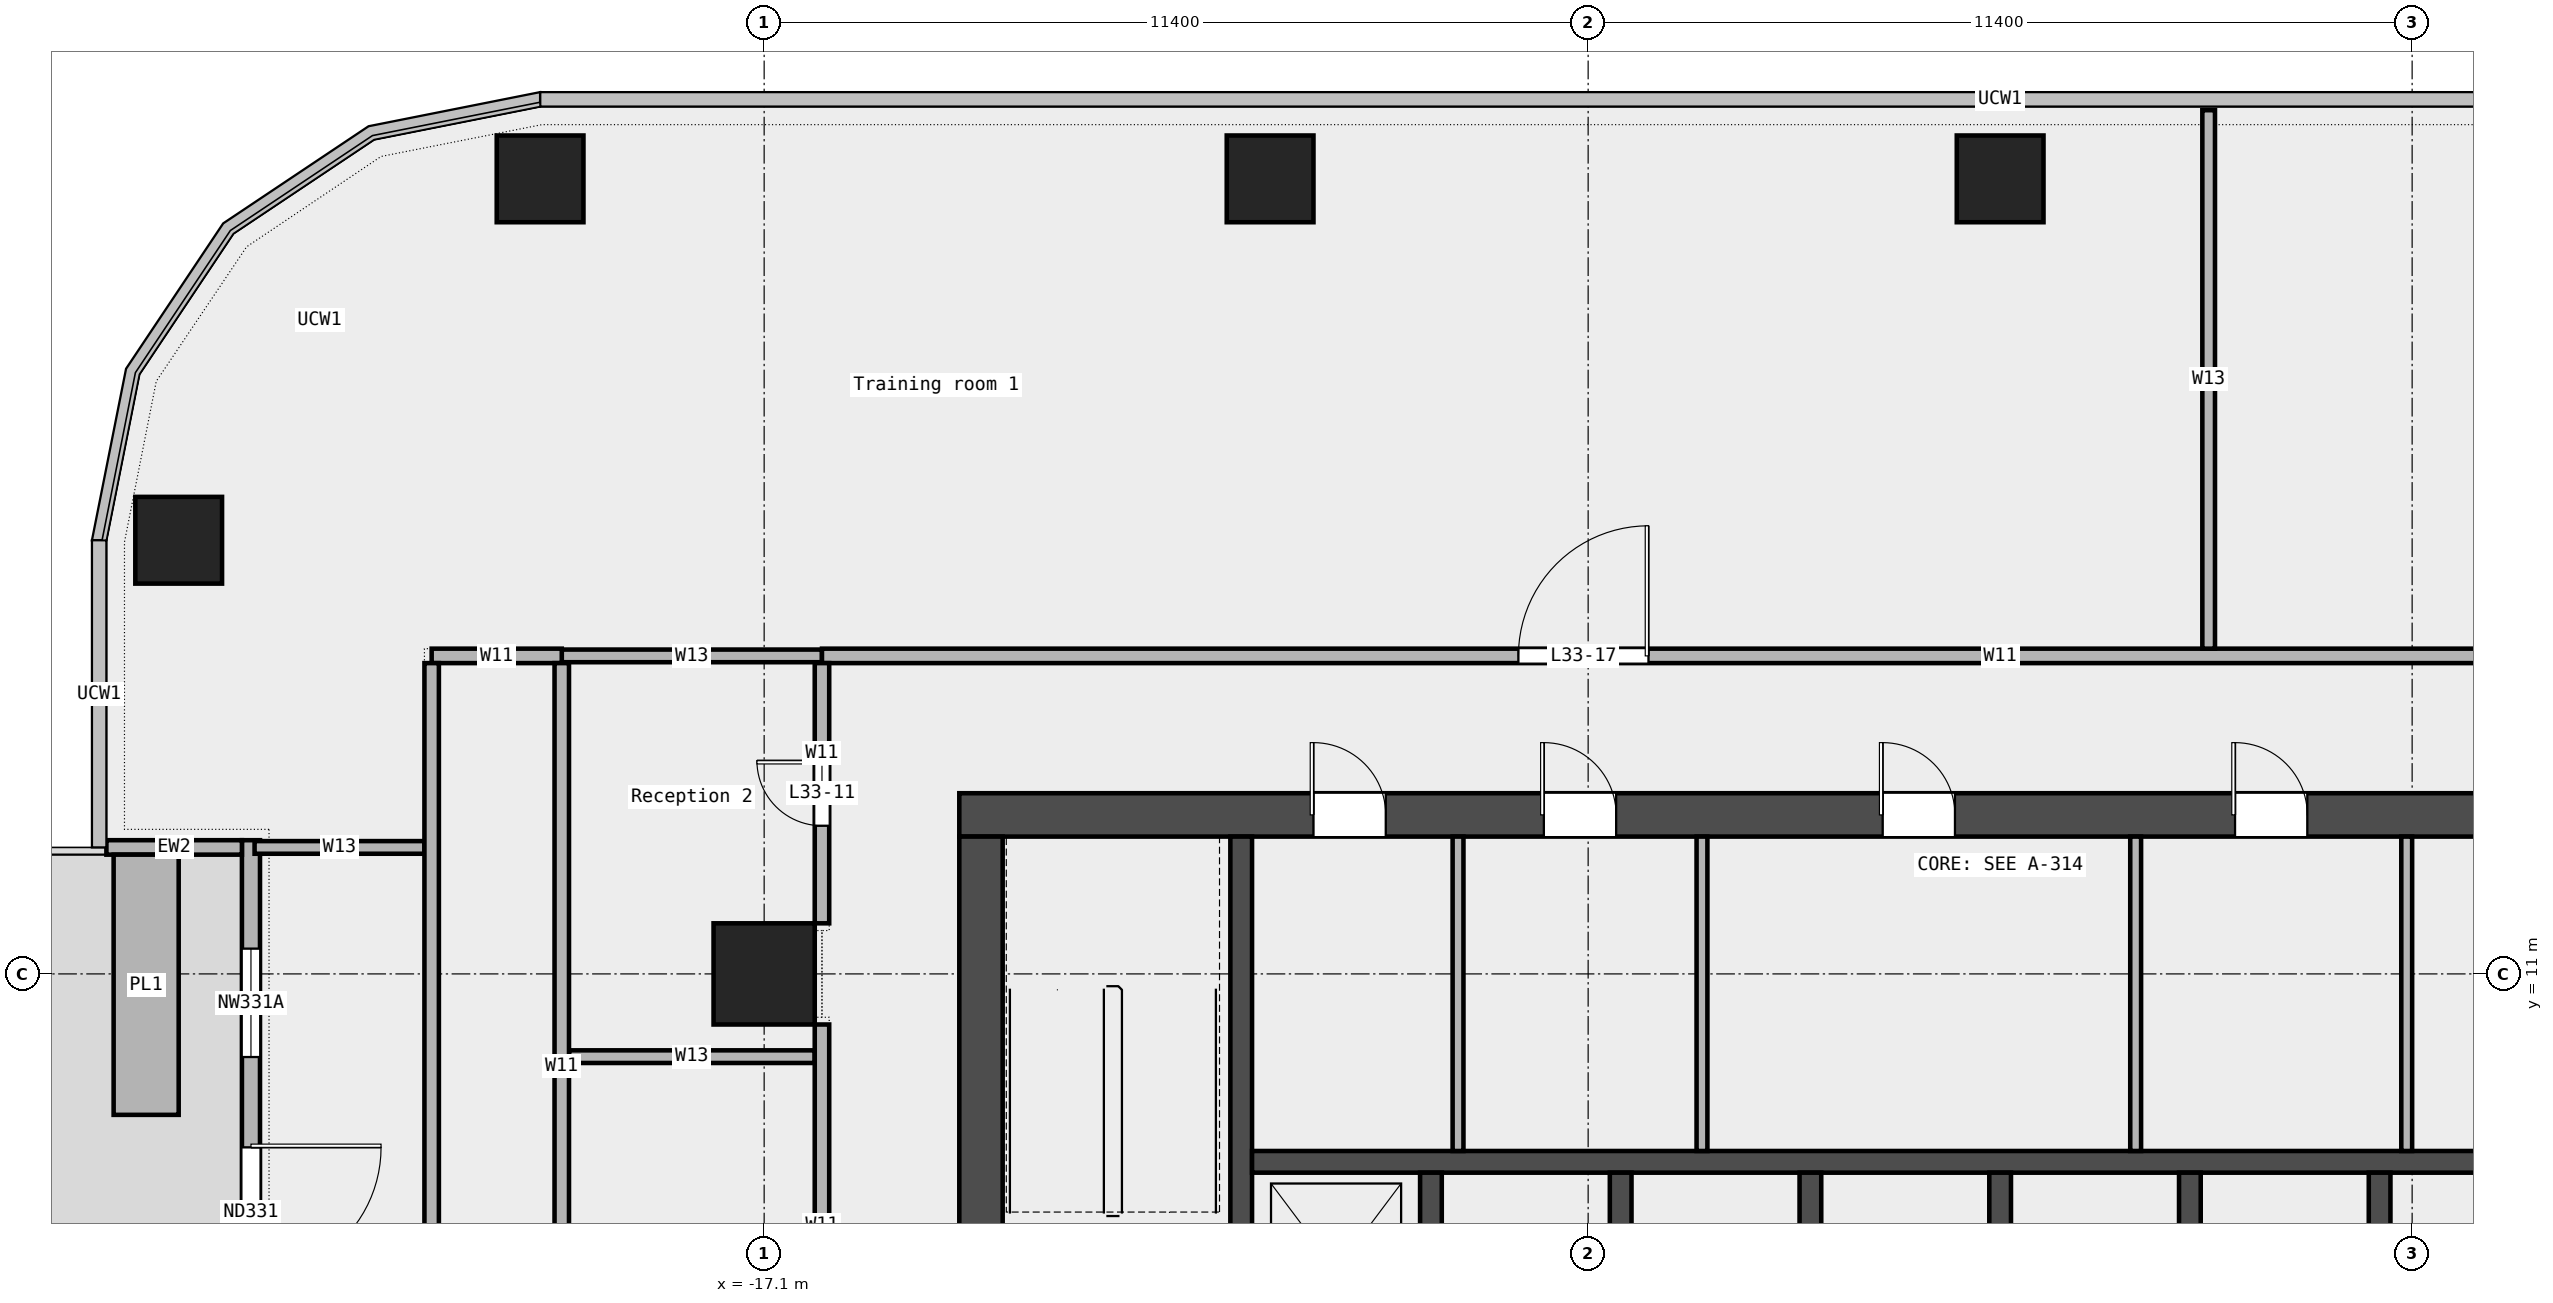
"""IFC4 building model, lengths in metres.
Left out: names, types, materials, properties, quantities, classifications, styles, units other than length and angle.
Written with IfcOpenShell. Run it as: python <this file> out.ifc"""

import sys

from ifc_helpers import new_model, si_unit, direction, frame, frame_2d, origin, origin_2d, place, context, subcontext, project, spatial, rectangle, extrude, element, fill, save


model = new_model("IFC4")
c1 = context("Model", 3, precision=1e-05, world=origin(), true_north=direction((0.0, 1.0)))
c2 = subcontext(c1, "Body", "Model", "MODEL_VIEW")
j1 = project(units=[si_unit("LENGTHUNIT", "METRE"), si_unit("PLANEANGLEUNIT", "RADIAN")], contexts=[c1])
p1 = place(None, origin())
s1 = spatial("IfcSite", under=j1, at=p1, CompositionType="ELEMENT")
p2 = place(p1, origin())
s2 = spatial("IfcBuilding", under=s1, at=p2, CompositionType="ELEMENT")
p3 = place(p2, frame((0.0, 0.0, 165.0)))
s3 = spatial("IfcBuildingStorey", under=s2, at=p3, CompositionType="ELEMENT", Elevation=165.0)
for number, where, z_axis, x_axis in (
    (1, (0.0, 22.0, 0.0), (0.0, 0.0, 1.0), (1.0, 0.0, 0.0)),
    (2, (-10.1, 22.0, 0.0), (0.0, 0.0, 1.0), (1.0, 0.0, 0.0)),
    (3, (-20.2, 22.0, 0.0), (0.0, 0.0, 1.0), (1.0, 0.0, 0.0)),
    (4, (-25.2, 17.0, 0.0), (0.0, 0.0, 1.0), (1.0, 0.0, 0.0)),
):
    element("IfcColumn", number, at=place(p3, frame(where, z_axis=z_axis, x_axis=x_axis)), inside=s3, PredefinedType="COLUMN", context=c2, shape_type="SweptSolid", body=[
        extrude(rectangle(XDim=1.2, YDim=1.2, at=origin_2d()), origin(), (0.0, 0.0, 1.0), 3.6),
    ])
p4 = place(p3, frame((-17.1, 11.0, 0.0), z_axis=(0.0, 0.0, 1.0), x_axis=(1.0, 0.0, 0.0)))
e5 = element("IfcColumn", 5, at=p4, inside=s3, PredefinedType="COLUMN", context=c2, shape_type="SweptSolid", body=[
    extrude(rectangle(XDim=1.4, YDim=1.4, at=origin_2d()), origin(), (0.0, 0.0, 1.0), 3.6),
])
p5 = place(p3, frame((-24.2, 12.85, 0.0), z_axis=(0.0, 0.0, 1.0), x_axis=(0.0, -1.0, 0.0)))
e6 = element("IfcWall", 6, at=p5, inside=s3, PredefinedType="STANDARD", context=c2, shape_type="SweptSolid", body=[
    extrude(rectangle(XDim=12.95, YDim=0.25, at=frame_2d((6.475, 0.0))), origin(), (0.0, 0.0, 1.0), 3.6),
])
p6 = place(p5, frame((1.5, 0.0, 0.45)))
e7 = element("IfcOpeningElement", 7, at=p6, cuts=e6, PredefinedType="OPENING", context=c2, shape_type="SweptSolid", body=[
    extrude(rectangle(XDim=1.5, YDim=2.4, at=frame_2d((0.75, 1.2))), frame((0.0, 0.137, 0.0), z_axis=(0.0, -1.0, 0.0), x_axis=(1.0, 0.0, 0.0)), (0.0, 0.0, 1.0), 0.274),
])
p7 = place(p5, frame((4.25, 0.0, 0.0)))
e8 = element("IfcOpeningElement", 8, at=p7, cuts=e6, PredefinedType="OPENING", context=c2, shape_type="SweptSolid", body=[
    extrude(rectangle(XDim=1.8, YDim=2.4, at=frame_2d((0.9, 1.2))), frame((0.0, 0.137, 0.0), z_axis=(0.0, -1.0, 0.0), x_axis=(1.0, 0.0, 0.0)), (0.0, 0.0, 1.0), 0.274),
])
p8 = place(p5, frame((10.0, 0.0, 0.45)))
e9 = element("IfcOpeningElement", 9, at=p8, cuts=e6, PredefinedType="OPENING", context=c2, shape_type="SweptSolid", body=[
    extrude(rectangle(XDim=1.5, YDim=2.4, at=frame_2d((0.75, 1.2))), frame((0.0, 0.137, 0.0), z_axis=(0.0, -1.0, 0.0), x_axis=(1.0, 0.0, 0.0)), (0.0, 0.0, 1.0), 0.274),
])
p9 = place(p3, frame((-26.2, 12.75, 0.0), z_axis=(0.0, 0.0, 1.0), x_axis=(1.0, 0.0, 0.0)))
e10 = element("IfcWall", 10, at=p9, inside=s3, PredefinedType="STANDARD", context=c2, shape_type="SweptSolid", body=[
    extrude(rectangle(XDim=1.875, YDim=0.2, at=frame_2d((0.938, 0.0))), origin(), (0.0, 0.0, 1.0), 3.6),
])
p10 = place(p3, frame((-25.65, 12.65, 0.0), z_axis=(0.0, 0.0, 1.0), x_axis=(0.0, -1.0, 0.0)))
e11 = element("IfcWall", 11, at=p10, inside=s3, PredefinedType="STANDARD", context=c2, shape_type="SweptSolid", body=[
    extrude(rectangle(XDim=3.6, YDim=0.9, at=frame_2d((1.8, 0.0))), origin(), (0.0, 0.0, 1.0), 0.7),
])
p11 = place(p3, frame((-19.8, 9.855, 0.0), z_axis=(0.0, 0.0, 1.0), x_axis=(1.0, 0.0, 0.0)))
e12 = element("IfcWall", 12, at=p11, inside=s3, PredefinedType="PARTITIONING", context=c2, shape_type="SweptSolid", body=[
    extrude(rectangle(XDim=3.4, YDim=0.175, at=frame_2d((1.7, 0.0))), origin(), (0.0, 0.0, 1.0), 3.6),
])
p12 = place(p3, frame((-24.15, 12.75, 0.0), z_axis=(0.0, 0.0, 1.0), x_axis=(1.0, 0.0, 0.0)))
e13 = element("IfcWall", 13, at=p12, inside=s3, PredefinedType="PARTITIONING", context=c2, shape_type="SweptSolid", body=[
    extrude(rectangle(XDim=2.35, YDim=0.175, at=frame_2d((1.175, 0.0))), origin(), (0.0, 0.0, 1.0), 3.6),
])
p13 = place(p3, frame((-19.9, 15.4, 0.0), z_axis=(0.0, 0.0, 1.0), x_axis=(1.0, 0.0, 0.0)))
e14 = element("IfcWall", 14, at=p13, inside=s3, PredefinedType="PARTITIONING", context=c2, shape_type="SweptSolid", body=[
    extrude(rectangle(XDim=3.6, YDim=0.175, at=frame_2d((1.8, 0.0))), origin(), (0.0, 0.0, 1.0), 3.6),
])
p14 = place(p3, frame((-21.7, 15.4, 0.0), z_axis=(0.0, 0.0, 1.0), x_axis=(1.0, 0.0, 0.0)))
e15 = element("IfcWall", 15, at=p14, inside=s3, PredefinedType="PARTITIONING", context=c2, shape_type="SweptSolid", body=[
    extrude(rectangle(XDim=1.8, YDim=0.2, at=frame_2d((0.9, 0.0))), origin(), (0.0, 0.0, 1.0), 3.6),
])
p15 = place(p3, frame((-16.3, 15.4, 0.0), z_axis=(0.0, 0.0, 1.0), x_axis=(1.0, 0.0, 0.0)))
e16 = element("IfcWall", 16, at=p15, inside=s3, PredefinedType="PARTITIONING", context=c2, shape_type="SweptSolid", body=[
    extrude(rectangle(XDim=32.6, YDim=0.2, at=frame_2d((16.3, 0.0))), origin(), (0.0, 0.0, 1.0), 3.6),
])
p16 = place(p15, frame((24.992, 0.0, 0.0)))
e17 = element("IfcOpeningElement", 17, at=p16, cuts=e16, PredefinedType="OPENING", context=c2, shape_type="SweptSolid", body=[
    extrude(rectangle(XDim=1.8, YDim=2.1, at=frame_2d((0.9, 1.05))), frame((0.0, 0.112, 0.0), z_axis=(0.0, -1.0, 0.0), x_axis=(1.0, 0.0, 0.0)), (0.0, 0.0, 1.0), 0.224),
])
p17 = place(p15, frame((9.635, 0.0, 0.0)))
e18 = element("IfcOpeningElement", 18, at=p17, cuts=e16, PredefinedType="OPENING", context=c2, shape_type="SweptSolid", body=[
    extrude(rectangle(XDim=1.8, YDim=2.1, at=frame_2d((0.9, 1.05))), frame((0.0, 0.112, 0.0), z_axis=(0.0, -1.0, 0.0), x_axis=(1.0, 0.0, 0.0)), (0.0, 0.0, 1.0), 0.224),
])
p18 = place(p3, frame((-21.7, -9.0, 0.0), z_axis=(0.0, 0.0, 1.0), x_axis=(0.0, 1.0, 0.0)))
e19 = element("IfcWall", 19, at=p18, inside=s3, PredefinedType="PARTITIONING", context=c2, shape_type="SweptSolid", body=[
    extrude(rectangle(XDim=24.3, YDim=0.2, at=frame_2d((12.15, 0.0))), origin(), (0.0, 0.0, 1.0), 3.6),
])
p19 = place(p18, frame((14.925, 0.0, 0.0)))
e20 = element("IfcOpeningElement", 20, at=p19, cuts=e19, PredefinedType="OPENING", context=c2, shape_type="SweptSolid", body=[
    extrude(rectangle(XDim=0.9, YDim=2.1, at=frame_2d((0.45, 1.05))), frame((0.0, 0.112, 0.0), z_axis=(0.0, -1.0, 0.0), x_axis=(1.0, 0.0, 0.0)), (0.0, 0.0, 1.0), 0.224),
])
p20 = place(p18, frame((4.05, 0.0, 0.0)))
e21 = element("IfcOpeningElement", 21, at=p20, cuts=e19, PredefinedType="OPENING", context=c2, shape_type="SweptSolid", body=[
    extrude(rectangle(XDim=0.9, YDim=2.1, at=frame_2d((0.45, 1.05))), frame((0.0, 0.112, 0.0), z_axis=(0.0, -1.0, 0.0), x_axis=(1.0, 0.0, 0.0)), (0.0, 0.0, 1.0), 0.224),
])
p21 = place(p3, frame((-19.9, 4.15, 0.0), z_axis=(0.0, 0.0, 1.0), x_axis=(0.0, 1.0, 0.0)))
e22 = element("IfcWall", 22, at=p21, inside=s3, PredefinedType="PARTITIONING", context=c2, shape_type="SweptSolid", body=[
    extrude(rectangle(XDim=11.15, YDim=0.2, at=frame_2d((5.575, 0.0))), origin(), (0.0, 0.0, 1.0), 3.6),
])
p22 = place(p3, frame((-16.3, 4.15, 0.0), z_axis=(0.0, 0.0, 1.0), x_axis=(0.0, 1.0, 0.0)))
e23 = element("IfcWall", 23, at=p22, inside=s3, PredefinedType="PARTITIONING", context=c2, shape_type="SweptSolid", body=[
    extrude(rectangle(XDim=6.15, YDim=0.2, at=frame_2d((3.075, 0.0))), origin(), (0.0, 0.0, 1.0), 3.6),
])
p23 = place(p22, frame((2.403, 0.0, 0.0)))
e24 = element("IfcOpeningElement", 24, at=p23, cuts=e23, PredefinedType="OPENING", context=c2, shape_type="SweptSolid", body=[
    extrude(rectangle(XDim=0.9, YDim=2.1, at=frame_2d((0.45, 1.05))), frame((0.0, 0.112, 0.0), z_axis=(0.0, -1.0, 0.0), x_axis=(1.0, 0.0, 0.0)), (0.0, 0.0, 1.0), 0.224),
])
p24 = place(p3, frame((-16.3, 11.7, 0.0), z_axis=(0.0, 0.0, 1.0), x_axis=(0.0, 1.0, 0.0)))
e25 = element("IfcWall", 25, at=p24, inside=s3, PredefinedType="PARTITIONING", context=c2, shape_type="SweptSolid", body=[
    extrude(rectangle(XDim=3.6, YDim=0.2, at=frame_2d((1.8, 0.0))), origin(), (0.0, 0.0, 1.0), 3.6),
])
p25 = place(p24, frame((1.35, 0.0, 0.0)))
e26 = element("IfcOpeningElement", 26, at=p25, cuts=e25, PredefinedType="OPENING", context=c2, shape_type="SweptSolid", body=[
    extrude(rectangle(XDim=0.9, YDim=2.1, at=frame_2d((0.45, 1.05))), frame((0.0, 0.112, 0.0), z_axis=(0.0, -1.0, 0.0), x_axis=(1.0, 0.0, 0.0)), (0.0, 0.0, 1.0), 0.224),
])
p26 = place(p3, frame((2.885, 15.5, 0.0), z_axis=(0.0, 0.0, 1.0), x_axis=(0.0, 1.0, 0.0)))
e27 = element("IfcWall", 27, at=p26, inside=s3, PredefinedType="PARTITIONING", context=c2, shape_type="SweptSolid", body=[
    extrude(rectangle(XDim=7.45, YDim=0.175, at=frame_2d((3.725, 0.0))), origin(), (0.0, 0.0, 1.0), 3.6),
])
p27 = place(p3, frame((-14.4, 13.2, 0.0), z_axis=(0.0, 0.0, 1.0), x_axis=(1.0, 0.0, 0.0)))
e28 = element("IfcWall", 28, at=p27, inside=s3, PredefinedType="SHEAR", context=c2, shape_type="SweptSolid", body=[
    extrude(rectangle(XDim=28.8, YDim=0.6, at=frame_2d((14.4, 0.0))), origin(), (0.0, 0.0, 1.0), 3.7),
])
p28 = place(p27, frame((4.9, 0.0, 0.0)))
e29 = element("IfcOpeningElement", 29, at=p28, cuts=e28, PredefinedType="OPENING", context=c2, shape_type="SweptSolid", body=[
    extrude(rectangle(XDim=1.0, YDim=2.1, at=frame_2d((0.5, 1.05))), frame((0.0, 0.312, 0.0), z_axis=(0.0, -1.0, 0.0), x_axis=(1.0, 0.0, 0.0)), (0.0, 0.0, 1.0), 0.624),
])
p29 = place(p27, frame((8.087, 0.0, 0.0)))
e30 = element("IfcOpeningElement", 30, at=p29, cuts=e28, PredefinedType="OPENING", context=c2, shape_type="SweptSolid", body=[
    extrude(rectangle(XDim=1.0, YDim=2.1, at=frame_2d((0.5, 1.05))), frame((0.0, 0.312, 0.0), z_axis=(0.0, -1.0, 0.0), x_axis=(1.0, 0.0, 0.0)), (0.0, 0.0, 1.0), 0.624),
])
p30 = place(p27, frame((12.775, 0.0, 0.0)))
e31 = element("IfcOpeningElement", 31, at=p30, cuts=e28, PredefinedType="OPENING", context=c2, shape_type="SweptSolid", body=[
    extrude(rectangle(XDim=1.0, YDim=2.1, at=frame_2d((0.5, 1.05))), frame((0.0, 0.312, 0.0), z_axis=(0.0, -1.0, 0.0), x_axis=(1.0, 0.0, 0.0)), (0.0, 0.0, 1.0), 0.624),
])
p31 = place(p27, frame((17.65, 0.0, 0.0)))
e32 = element("IfcOpeningElement", 32, at=p31, cuts=e28, PredefinedType="OPENING", context=c2, shape_type="SweptSolid", body=[
    extrude(rectangle(XDim=1.0, YDim=2.1, at=frame_2d((0.5, 1.05))), frame((0.0, 0.312, 0.0), z_axis=(0.0, -1.0, 0.0), x_axis=(1.0, 0.0, 0.0)), (0.0, 0.0, 1.0), 0.624),
])
p32 = place(p27, frame((21.962, 0.0, 0.0)))
e33 = element("IfcOpeningElement", 33, at=p32, cuts=e28, PredefinedType="OPENING", context=c2, shape_type="SweptSolid", body=[
    extrude(rectangle(XDim=1.0, YDim=2.1, at=frame_2d((0.5, 1.05))), frame((0.0, 0.312, 0.0), z_axis=(0.0, -1.0, 0.0), x_axis=(1.0, 0.0, 0.0)), (0.0, 0.0, 1.0), 0.624),
])
p33 = place(p3, frame((-14.1, -6.6, 0.0), z_axis=(0.0, 0.0, 1.0), x_axis=(0.0, 1.0, 0.0)))
e34 = element("IfcWall", 34, at=p33, inside=s3, PredefinedType="SHEAR", context=c2, shape_type="SweptSolid", body=[
    extrude(rectangle(XDim=19.5, YDim=0.6, at=frame_2d((9.75, 0.0))), origin(), (0.0, 0.0, 1.0), 3.7),
])
p34 = place(p33, frame((9.3, 0.0, 0.0)))
e35 = element("IfcOpeningElement", 35, at=p34, cuts=e34, PredefinedType="OPENING", context=c2, shape_type="SweptSolid", body=[
    extrude(rectangle(XDim=1.8, YDim=2.1, at=frame_2d((0.9, 1.05))), frame((0.0, 0.312, 0.0), z_axis=(0.0, -1.0, 0.0), x_axis=(1.0, 0.0, 0.0)), (0.0, 0.0, 1.0), 0.624),
])
p35 = place(p3, frame((-10.5, 5.25, 0.0), z_axis=(0.0, 0.0, 1.0), x_axis=(0.0, 1.0, 0.0)))
e36 = element("IfcWall", 36, at=p35, inside=s3, PredefinedType="SHEAR", context=c2, shape_type="SweptSolid", body=[
    extrude(rectangle(XDim=7.65, YDim=0.3, at=frame_2d((3.825, 0.0))), origin(), (0.0, 0.0, 1.0), 3.7),
])
p36 = place(p3, frame((-10.35, 8.4, 0.0), z_axis=(0.0, 0.0, 1.0), x_axis=(1.0, 0.0, 0.0)))
e37 = element("IfcWall", 37, at=p36, inside=s3, PredefinedType="SOLIDWALL", context=c2, shape_type="SweptSolid", body=[
    extrude(rectangle(XDim=20.7, YDim=0.3, at=frame_2d((10.35, 0.0))), origin(), (0.0, 0.0, 1.0), 3.7),
])
for number, where, z_axis, x_axis in (
    (38, (-7.875, 5.55, 0.0), (0.0, 0.0, 1.0), (0.0, 1.0, 0.0)),
    (39, (-5.25, 5.55, 0.0), (0.0, 0.0, 1.0), (0.0, 1.0, 0.0)),
    (40, (-2.625, 5.55, 0.0), (0.0, 0.0, 1.0), (0.0, 1.0, 0.0)),
    (41, (0.0, 5.55, 0.0), (0.0, 0.0, 1.0), (0.0, 1.0, 0.0)),
    (42, (2.625, 5.55, 0.0), (0.0, 0.0, 1.0), (0.0, 1.0, 0.0)),
    (43, (5.25, 5.55, 0.0), (0.0, 0.0, 1.0), (0.0, 1.0, 0.0)),
):
    element("IfcWall", number, at=place(p3, frame(where, z_axis=z_axis, x_axis=x_axis)), inside=s3, PredefinedType="SOLIDWALL", context=c2, shape_type="SweptSolid", body=[
        extrude(rectangle(XDim=2.7, YDim=0.3, at=frame_2d((1.35, 0.0))), origin(), (0.0, 0.0, 1.0), 3.7),
    ])
for number, where, z_axis, x_axis in (
    (44, (-7.5, 8.55, 0.0), (0.0, 0.0, 1.0), (0.0, 1.0, 0.0)),
    (45, (-4.125, 8.55, 0.0), (0.0, 0.0, 1.0), (0.0, 1.0, 0.0)),
    (46, (1.875, 8.55, 0.0), (0.0, 0.0, 1.0), (0.0, 1.0, 0.0)),
    (47, (5.625, 8.55, 0.0), (0.0, 0.0, 1.0), (0.0, 1.0, 0.0)),
):
    element("IfcWall", number, at=place(p3, frame(where, z_axis=z_axis, x_axis=x_axis)), inside=s3, PredefinedType="PARTITIONING", context=c2, shape_type="SweptSolid", body=[
        extrude(rectangle(XDim=4.35, YDim=0.15, at=frame_2d((2.175, 0.0))), origin(), (0.0, 0.0, 1.0), 3.7),
    ])
p37 = place(p6, origin())
e48 = element("IfcWindow", 48, at=p37, inside=s3, PartitioningType="SINGLE_PANEL", PredefinedType="WINDOW", context=c2, shape_type="SweptSolid", body=[
    extrude(rectangle(XDim=1.5, YDim=2.4, at=frame_2d((0.75, 1.2))), frame((0.0, 0.03, 0.0), z_axis=(0.0, -1.0, 0.0), x_axis=(1.0, 0.0, 0.0)), (0.0, 0.0, 1.0), 0.06),
])
fill(e7, e48)
p38 = place(p7, origin())
e49 = element("IfcDoor", 49, at=p38, inside=s3, OperationType="DOUBLE_DOOR_SINGLE_SWING", PredefinedType="DOOR", context=c2, shape_type="SweptSolid", body=[
    extrude(rectangle(XDim=1.8, YDim=2.4, at=frame_2d((0.9, 1.2))), frame((0.0, 0.025, 0.0), z_axis=(0.0, -1.0, 0.0), x_axis=(1.0, 0.0, 0.0)), (0.0, 0.0, 1.0), 0.05),
])
fill(e8, e49)
p39 = place(p25, origin())
e50 = element("IfcDoor", 50, at=p39, inside=s3, OperationType="SINGLE_SWING_RIGHT", PredefinedType="DOOR", context=c2, shape_type="SweptSolid", body=[
    extrude(rectangle(XDim=0.9, YDim=2.1, at=frame_2d((0.45, 1.05))), frame((0.0, 0.025, 0.0), z_axis=(0.0, -1.0, 0.0), x_axis=(1.0, 0.0, 0.0)), (0.0, 0.0, 1.0), 0.05),
])
fill(e26, e50)
p40 = place(p17, origin())
e51 = element("IfcDoor", 51, at=p40, inside=s3, OperationType="DOUBLE_DOOR_SINGLE_SWING", PredefinedType="DOOR", context=c2, shape_type="SweptSolid", body=[
    extrude(rectangle(XDim=1.8, YDim=2.1, at=frame_2d((0.9, 1.05))), frame((0.0, 0.025, 0.0), z_axis=(0.0, -1.0, 0.0), x_axis=(1.0, 0.0, 0.0)), (0.0, 0.0, 1.0), 0.05),
])
fill(e18, e51)
p41 = place(p28, origin())
e52 = element("IfcDoor", 52, at=p41, inside=s3, OperationType="SINGLE_SWING_LEFT", PredefinedType="DOOR", context=c2, shape_type="SweptSolid", body=[
    extrude(rectangle(XDim=1.0, YDim=2.1, at=frame_2d((0.5, 1.05))), frame((0.0, 0.025, 0.0), z_axis=(0.0, -1.0, 0.0), x_axis=(1.0, 0.0, 0.0)), (0.0, 0.0, 1.0), 0.05),
])
fill(e29, e52)
p42 = place(p29, origin())
e53 = element("IfcDoor", 53, at=p42, inside=s3, OperationType="SINGLE_SWING_LEFT", PredefinedType="DOOR", context=c2, shape_type="SweptSolid", body=[
    extrude(rectangle(XDim=1.0, YDim=2.1, at=frame_2d((0.5, 1.05))), frame((0.0, 0.025, 0.0), z_axis=(0.0, -1.0, 0.0), x_axis=(1.0, 0.0, 0.0)), (0.0, 0.0, 1.0), 0.05),
])
fill(e30, e53)
p43 = place(p30, origin())
e54 = element("IfcDoor", 54, at=p43, inside=s3, OperationType="SINGLE_SWING_LEFT", PredefinedType="DOOR", context=c2, shape_type="SweptSolid", body=[
    extrude(rectangle(XDim=1.0, YDim=2.1, at=frame_2d((0.5, 1.05))), frame((0.0, 0.025, 0.0), z_axis=(0.0, -1.0, 0.0), x_axis=(1.0, 0.0, 0.0)), (0.0, 0.0, 1.0), 0.05),
])
fill(e31, e54)
p44 = place(p31, origin())
e55 = element("IfcDoor", 55, at=p44, inside=s3, OperationType="SINGLE_SWING_LEFT", PredefinedType="DOOR", context=c2, shape_type="SweptSolid", body=[
    extrude(rectangle(XDim=1.0, YDim=2.1, at=frame_2d((0.5, 1.05))), frame((0.0, 0.025, 0.0), z_axis=(0.0, -1.0, 0.0), x_axis=(1.0, 0.0, 0.0)), (0.0, 0.0, 1.0), 0.05),
])
fill(e32, e55)
save(model, sys.argv[1])
